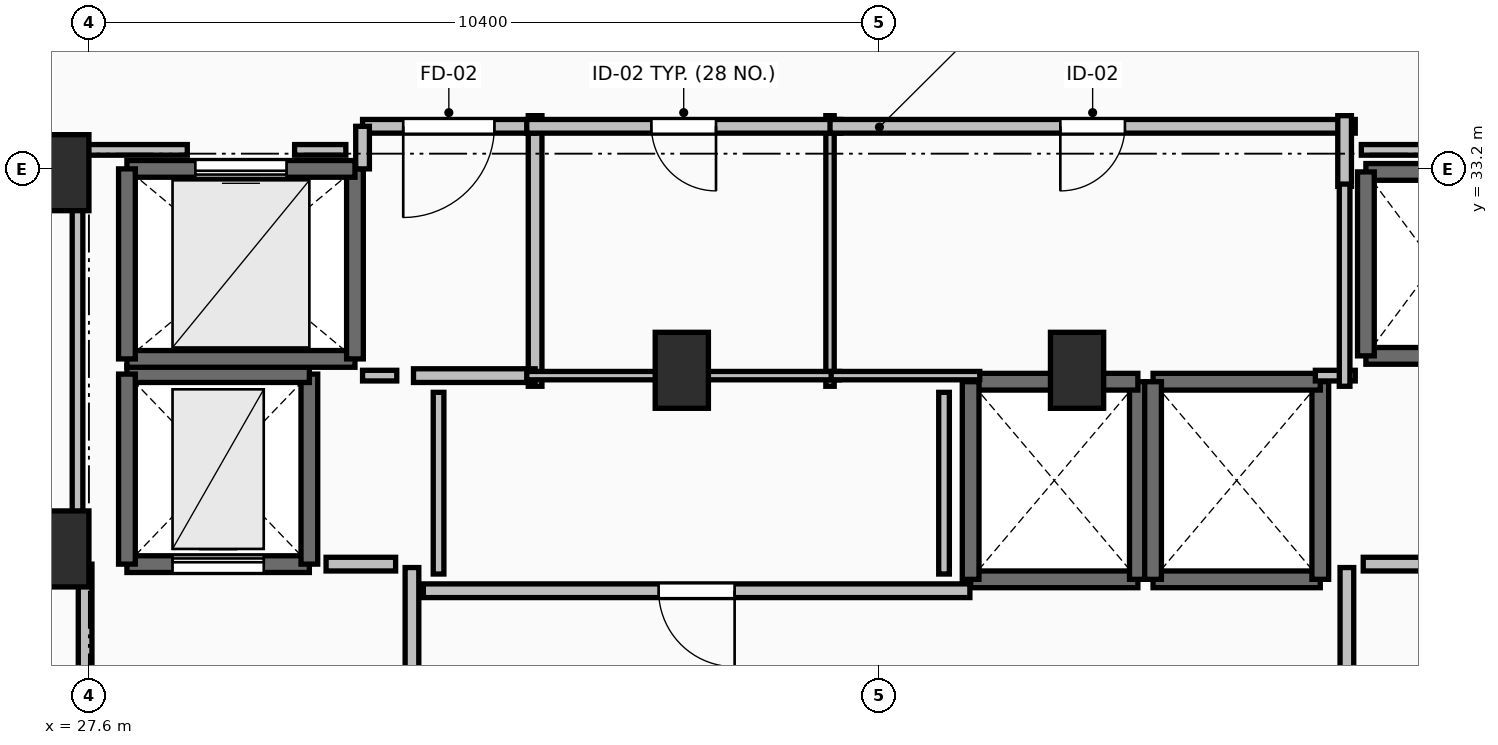
"""IFC4 building model, lengths in metres.
Left out: names, types, materials, properties, quantities, classifications, styles, units other than length and angle.
Written with IfcOpenShell. Run it as: python <this file> out.ifc"""

import sys

from ifc_helpers import new_model, si_unit, direction, frame, frame_2d, origin, origin_2d, place, context, subcontext, project, spatial, rectangle, extrude, element, fill, save


model = new_model("IFC4")
c1 = context("Model", 3, precision=1e-05, world=origin(), true_north=direction((0.0, 1.0)))
c2 = subcontext(c1, "Body", "Model", "MODEL_VIEW")
j1 = project(units=[si_unit("LENGTHUNIT", "METRE"), si_unit("PLANEANGLEUNIT", "RADIAN")], contexts=[c1])
p1 = place(None, origin())
s1 = spatial("IfcSite", under=j1, at=p1, CompositionType="ELEMENT")
p2 = place(p1, origin())
s2 = spatial("IfcBuilding", under=s1, at=p2, CompositionType="ELEMENT")
p3 = place(p2, frame((0.0, 0.0, 207.2)))
s3 = spatial("IfcBuildingStorey", under=s2, at=p3, CompositionType="ELEMENT", Elevation=207.2)
for number, where, z_axis, x_axis in (
    (1, (27.25, 28.2, 0.0), (0.0, 0.0, 1.0), (1.0, 0.0, 0.0)),
    (2, (27.25, 33.15, 0.0), (0.0, 0.0, 1.0), (1.0, 0.0, 0.0)),
    (3, (35.4, 30.55, 0.0), (0.0, 0.0, 1.0), (1.0, 0.0, 0.0)),
    (4, (40.6, 30.55, 0.0), (0.0, 0.0, 1.0), (1.0, 0.0, 0.0)),
):
    element("IfcColumn", number, at=place(p3, frame(where, z_axis=z_axis, x_axis=x_axis)), inside=s3, PredefinedType="PILASTER", context=c2, shape_type="SweptSolid", body=[
        extrude(rectangle(XDim=0.7, YDim=1.0, at=origin_2d()), origin(), (0.0, 0.0, 1.0), 3.55),
    ])
p4 = place(p3, frame((39.2, 27.8, 0.0), z_axis=(0.0, 0.0, 1.0), x_axis=(1.0, 0.0, 0.0)))
e5 = element("IfcWall", 5, at=p4, inside=s3, PredefinedType="SOLIDWALL", context=c2, shape_type="SweptSolid", body=[
    extrude(rectangle(XDim=2.2, YDim=0.22, at=frame_2d((1.1, 0.0))), origin(), (0.0, 0.0, 1.0), 3.29),
])
p5 = place(p3, frame((41.4, 27.8, 0.0), z_axis=(0.0, 0.0, 1.0), x_axis=(0.0, 1.0, 0.0)))
e6 = element("IfcWall", 6, at=p5, inside=s3, PredefinedType="SOLIDWALL", context=c2, shape_type="SweptSolid", body=[
    extrude(rectangle(XDim=2.6, YDim=0.22, at=frame_2d((1.3, 0.0))), origin(), (0.0, 0.0, 1.0), 3.29),
])
p6 = place(p3, frame((41.4, 30.4, 0.0), z_axis=(0.0, 0.0, 1.0), x_axis=(-1.0, 0.0, 0.0)))
e7 = element("IfcWall", 7, at=p6, inside=s3, PredefinedType="SOLIDWALL", context=c2, shape_type="SweptSolid", body=[
    extrude(rectangle(XDim=2.2, YDim=0.22, at=frame_2d((1.1, 0.0))), origin(), (0.0, 0.0, 1.0), 3.29),
])
p7 = place(p3, frame((39.2, 30.4, 0.0), z_axis=(0.0, 0.0, 1.0), x_axis=(0.0, -1.0, 0.0)))
e8 = element("IfcWall", 8, at=p7, inside=s3, PredefinedType="SOLIDWALL", context=c2, shape_type="SweptSolid", body=[
    extrude(rectangle(XDim=2.6, YDim=0.22, at=frame_2d((1.3, 0.0))), origin(), (0.0, 0.0, 1.0), 3.29),
])
p8 = place(p3, frame((41.6, 27.8, 0.0), z_axis=(0.0, 0.0, 1.0), x_axis=(1.0, 0.0, 0.0)))
e9 = element("IfcWall", 9, at=p8, inside=s3, PredefinedType="SOLIDWALL", context=c2, shape_type="SweptSolid", body=[
    extrude(rectangle(XDim=2.2, YDim=0.22, at=frame_2d((1.1, 0.0))), origin(), (0.0, 0.0, 1.0), 3.29),
])
p9 = place(p3, frame((43.8, 27.8, 0.0), z_axis=(0.0, 0.0, 1.0), x_axis=(0.0, 1.0, 0.0)))
e10 = element("IfcWall", 10, at=p9, inside=s3, PredefinedType="SOLIDWALL", context=c2, shape_type="SweptSolid", body=[
    extrude(rectangle(XDim=2.6, YDim=0.22, at=frame_2d((1.3, 0.0))), origin(), (0.0, 0.0, 1.0), 3.29),
])
p10 = place(p3, frame((43.8, 30.4, 0.0), z_axis=(0.0, 0.0, 1.0), x_axis=(-1.0, 0.0, 0.0)))
e11 = element("IfcWall", 11, at=p10, inside=s3, PredefinedType="SOLIDWALL", context=c2, shape_type="SweptSolid", body=[
    extrude(rectangle(XDim=2.2, YDim=0.22, at=frame_2d((1.1, 0.0))), origin(), (0.0, 0.0, 1.0), 3.29),
])
p11 = place(p3, frame((41.6, 30.4, 0.0), z_axis=(0.0, 0.0, 1.0), x_axis=(0.0, -1.0, 0.0)))
e12 = element("IfcWall", 12, at=p11, inside=s3, PredefinedType="SOLIDWALL", context=c2, shape_type="SweptSolid", body=[
    extrude(rectangle(XDim=2.6, YDim=0.22, at=frame_2d((1.3, 0.0))), origin(), (0.0, 0.0, 1.0), 3.29),
])
for number, where, z_axis, x_axis in (
    (13, (44.4, 30.74, 0.0), (0.0, 0.0, 1.0), (1.0, 0.0, 0.0)),
    (14, (46.2, 33.16, 0.0), (0.0, 0.0, 1.0), (-1.0, 0.0, 0.0)),
):
    element("IfcWall", number, at=place(p3, frame(where, z_axis=z_axis, x_axis=x_axis)), inside=s3, PredefinedType="SOLIDWALL", context=c2, shape_type="SweptSolid", body=[
        extrude(rectangle(XDim=1.8, YDim=0.22, at=frame_2d((0.9, 0.0))), origin(), (0.0, 0.0, 1.0), 3.29),
    ])
p12 = place(p3, frame((44.4, 33.16, 0.0), z_axis=(0.0, 0.0, 1.0), x_axis=(0.0, -1.0, 0.0)))
e15 = element("IfcWall", 15, at=p12, inside=s3, PredefinedType="SOLIDWALL", context=c2, shape_type="SweptSolid", body=[
    extrude(rectangle(XDim=2.42, YDim=0.22, at=frame_2d((1.21, 0.0))), origin(), (0.0, 0.0, 1.0), 3.29),
])
p13 = place(p3, frame((28.1, 28.0, 0.0), z_axis=(0.0, 0.0, 1.0), x_axis=(1.0, 0.0, 0.0)))
e16 = element("IfcWall", 16, at=p13, inside=s3, PredefinedType="SHEAR", context=c2, shape_type="SweptSolid", body=[
    extrude(rectangle(XDim=2.4, YDim=0.22, at=frame_2d((1.2, 0.0))), origin(), (0.0, 0.0, 1.0), 3.29),
])
p14 = place(p13, frame((0.6, 0.0, 0.0)))
e17 = element("IfcOpeningElement", 17, at=p14, cuts=e16, PredefinedType="OPENING", context=c2, shape_type="SweptSolid", body=[
    extrude(rectangle(XDim=1.2, YDim=2.2, at=frame_2d((0.6, 1.1))), frame((0.0, 0.125, 0.0), z_axis=(0.0, -1.0, 0.0), x_axis=(1.0, 0.0, 0.0)), (0.0, 0.0, 1.0), 0.25),
])
p15 = place(p3, frame((30.5, 28.0, 0.0), z_axis=(0.0, 0.0, 1.0), x_axis=(0.0, 1.0, 0.0)))
e18 = element("IfcWall", 18, at=p15, inside=s3, PredefinedType="SHEAR", context=c2, shape_type="SweptSolid", body=[
    extrude(rectangle(XDim=2.5, YDim=0.22, at=frame_2d((1.25, 0.0))), origin(), (0.0, 0.0, 1.0), 3.29),
])
p16 = place(p3, frame((30.5, 30.5, 0.0), z_axis=(0.0, 0.0, 1.0), x_axis=(-1.0, 0.0, 0.0)))
e19 = element("IfcWall", 19, at=p16, inside=s3, PredefinedType="SHEAR", context=c2, shape_type="SweptSolid", body=[
    extrude(rectangle(XDim=2.4, YDim=0.22, at=frame_2d((1.2, 0.0))), origin(), (0.0, 0.0, 1.0), 3.29),
])
p17 = place(p3, frame((28.1, 30.5, 0.0), z_axis=(0.0, 0.0, 1.0), x_axis=(0.0, -1.0, 0.0)))
e20 = element("IfcWall", 20, at=p17, inside=s3, PredefinedType="SHEAR", context=c2, shape_type="SweptSolid", body=[
    extrude(rectangle(XDim=2.5, YDim=0.22, at=frame_2d((1.25, 0.0))), origin(), (0.0, 0.0, 1.0), 3.29),
])
p18 = place(p3, frame((28.1, 30.7, 0.0), z_axis=(0.0, 0.0, 1.0), x_axis=(1.0, 0.0, 0.0)))
e21 = element("IfcWall", 21, at=p18, inside=s3, PredefinedType="SOLIDWALL", context=c2, shape_type="SweptSolid", body=[
    extrude(rectangle(XDim=3.0, YDim=0.22, at=frame_2d((1.5, 0.0))), origin(), (0.0, 0.0, 1.0), 3.29),
])
p19 = place(p3, frame((31.1, 30.7, 0.0), z_axis=(0.0, 0.0, 1.0), x_axis=(0.0, 1.0, 0.0)))
e22 = element("IfcWall", 22, at=p19, inside=s3, PredefinedType="SOLIDWALL", context=c2, shape_type="SweptSolid", body=[
    extrude(rectangle(XDim=2.5, YDim=0.22, at=frame_2d((1.25, 0.0))), origin(), (0.0, 0.0, 1.0), 3.29),
])
p20 = place(p3, frame((31.1, 33.2, 0.0), z_axis=(0.0, 0.0, 1.0), x_axis=(-1.0, 0.0, 0.0)))
e23 = element("IfcWall", 23, at=p20, inside=s3, PredefinedType="SOLIDWALL", context=c2, shape_type="SweptSolid", body=[
    extrude(rectangle(XDim=3.0, YDim=0.22, at=frame_2d((1.5, 0.0))), origin(), (0.0, 0.0, 1.0), 3.29),
])
p21 = place(p20, frame((0.9, 0.0, 0.0)))
e24 = element("IfcOpeningElement", 24, at=p21, cuts=e23, PredefinedType="OPENING", context=c2, shape_type="SweptSolid", body=[
    extrude(rectangle(XDim=1.2, YDim=2.2, at=frame_2d((0.6, 1.1))), frame((0.0, 0.125, 0.0), z_axis=(0.0, -1.0, 0.0), x_axis=(1.0, 0.0, 0.0)), (0.0, 0.0, 1.0), 0.25),
])
p22 = place(p3, frame((28.1, 33.2, 0.0), z_axis=(0.0, 0.0, 1.0), x_axis=(0.0, -1.0, 0.0)))
e25 = element("IfcWall", 25, at=p22, inside=s3, PredefinedType="SOLIDWALL", context=c2, shape_type="SweptSolid", body=[
    extrude(rectangle(XDim=2.5, YDim=0.22, at=frame_2d((1.25, 0.0))), origin(), (0.0, 0.0, 1.0), 3.29),
])
p23 = place(p3, frame((31.85, 24.045, 0.0), z_axis=(0.0, 0.0, 1.0), x_axis=(0.0, 1.0, 0.0)))
e26 = element("IfcWall", 26, at=p23, inside=s3, PredefinedType="PARTITIONING", context=c2, shape_type="SweptSolid", body=[
    extrude(rectangle(XDim=3.91, YDim=0.18, at=frame_2d((1.955, 0.0))), origin(), (0.0, 0.0, 1.0), 3.29),
])
p24 = place(p23, frame((1.355, 0.0, 0.0)))
e27 = element("IfcOpeningElement", 27, at=p24, cuts=e26, PredefinedType="OPENING", context=c2, shape_type="SweptSolid", body=[
    extrude(rectangle(XDim=1.2, YDim=2.15, at=frame_2d((0.6, 1.075))), frame((0.0, 0.105, 0.0), z_axis=(0.0, -1.0, 0.0), x_axis=(1.0, 0.0, 0.0)), (0.0, 0.0, 1.0), 0.21),
])
p25 = place(p3, frame((27.55, 28.0, 0.0), z_axis=(0.0, 0.0, 1.0), x_axis=(0.0, -1.0, 0.0)))
e28 = element("IfcWall", 28, at=p25, inside=s3, PredefinedType="PARTITIONING", context=c2, shape_type="SweptSolid", body=[
    extrude(rectangle(XDim=4.05, YDim=0.18, at=frame_2d((2.025, 0.0))), origin(), (0.0, 0.0, 1.0), 3.29),
])
p26 = place(p25, frame((1.425, 0.0, 0.0)))
e29 = element("IfcOpeningElement", 29, at=p26, cuts=e28, PredefinedType="OPENING", context=c2, shape_type="SweptSolid", body=[
    extrude(rectangle(XDim=1.2, YDim=2.15, at=frame_2d((0.6, 1.075))), frame((0.0, 0.105, 0.0), z_axis=(0.0, -1.0, 0.0), x_axis=(1.0, 0.0, 0.0)), (0.0, 0.0, 1.0), 0.21),
])
p27 = place(p3, frame((44.15, 27.955, 0.0), z_axis=(0.0, 0.0, 1.0), x_axis=(0.0, -1.0, 0.0)))
e30 = element("IfcWall", 30, at=p27, inside=s3, PredefinedType="PARTITIONING", context=c2, shape_type="SweptSolid", body=[
    extrude(rectangle(XDim=3.91, YDim=0.18, at=frame_2d((1.955, 0.0))), origin(), (0.0, 0.0, 1.0), 3.29),
])
p28 = place(p27, frame((1.355, 0.0, 0.0)))
e31 = element("IfcOpeningElement", 31, at=p28, cuts=e30, PredefinedType="OPENING", context=c2, shape_type="SweptSolid", body=[
    extrude(rectangle(XDim=1.2, YDim=2.15, at=frame_2d((0.6, 1.075))), frame((0.0, 0.105, 0.0), z_axis=(0.0, -1.0, 0.0), x_axis=(1.0, 0.0, 0.0)), (0.0, 0.0, 1.0), 0.21),
])
p29 = place(p3, frame((33.47, 30.34, 0.0), z_axis=(0.0, 0.0, 1.0), x_axis=(0.0, 1.0, 0.0)))
e32 = element("IfcWall", 32, at=p29, inside=s3, PredefinedType="PARTITIONING", context=c2, shape_type="SweptSolid", body=[
    extrude(rectangle(XDim=3.56, YDim=0.18, at=frame_2d((1.78, 0.0))), origin(), (0.0, 0.0, 1.0), 3.29),
])
p30 = place(p3, frame((31.87, 30.48, 0.0), z_axis=(0.0, 0.0, 1.0), x_axis=(1.0, 0.0, 0.0)))
e33 = element("IfcWall", 33, at=p30, inside=s3, PredefinedType="PARTITIONING", context=c2, shape_type="SweptSolid", body=[
    extrude(rectangle(XDim=1.6, YDim=0.18, at=frame_2d((0.8, 0.0))), origin(), (0.0, 0.0, 1.0), 3.29),
])
p31 = place(p3, frame((33.47, 33.76, 0.0), z_axis=(0.0, 0.0, 1.0), x_axis=(-1.0, 0.0, 0.0)))
e34 = element("IfcWall", 34, at=p31, inside=s3, PredefinedType="PARTITIONING", context=c2, shape_type="SweptSolid", body=[
    extrude(rectangle(XDim=2.27, YDim=0.18, at=frame_2d((1.135, 0.0))), origin(), (0.0, 0.0, 1.0), 3.29),
])
p32 = place(p31, frame((0.535, 0.0, 0.0)))
e35 = element("IfcOpeningElement", 35, at=p32, cuts=e34, PredefinedType="OPENING", context=c2, shape_type="SweptSolid", body=[
    extrude(rectangle(XDim=1.2, YDim=2.15, at=frame_2d((0.6, 1.075))), frame((0.0, 0.105, 0.0), z_axis=(0.0, -1.0, 0.0), x_axis=(1.0, 0.0, 0.0)), (0.0, 0.0, 1.0), 0.21),
])
p33 = place(p3, frame((31.2, 33.76, 0.0), z_axis=(0.0, 0.0, 1.0), x_axis=(0.0, -1.0, 0.0)))
e36 = element("IfcWall", 36, at=p33, inside=s3, PredefinedType="PARTITIONING", context=c2, shape_type="SweptSolid", body=[
    extrude(rectangle(XDim=0.56, YDim=0.18, at=frame_2d((0.28, 0.0))), origin(), (0.0, 0.0, 1.0), 3.29),
])
p34 = place(p3, frame((39.19, 27.65, 0.0), z_axis=(0.0, 0.0, 1.0), x_axis=(-1.0, 0.0, 0.0)))
e37 = element("IfcWall", 37, at=p34, inside=s3, PredefinedType="PARTITIONING", context=c2, shape_type="SweptSolid", body=[
    extrude(rectangle(XDim=7.19, YDim=0.18, at=frame_2d((3.595, 0.0))), origin(), (0.0, 0.0, 1.0), 3.29),
])
p35 = place(p34, frame((3.095, 0.0, 0.0)))
e38 = element("IfcOpeningElement", 38, at=p35, cuts=e37, PredefinedType="OPENING", context=c2, shape_type="SweptSolid", body=[
    extrude(rectangle(XDim=1.0, YDim=2.15, at=frame_2d((0.5, 1.075))), frame((0.0, 0.105, 0.0), z_axis=(0.0, -1.0, 0.0), x_axis=(1.0, 0.0, 0.0)), (0.0, 0.0, 1.0), 0.21),
])
p36 = place(p3, frame((37.35, 30.34, 0.0), z_axis=(0.0, 0.0, 1.0), x_axis=(0.0, 1.0, 0.0)))
e39 = element("IfcWall", 39, at=p36, inside=s3, PredefinedType="PARTITIONING", context=c2, shape_type="SweptSolid", body=[
    extrude(rectangle(XDim=3.56, YDim=0.11, at=frame_2d((1.78, 0.0))), origin(), (0.0, 0.0, 1.0), 2.482),
])
p37 = place(p3, frame((33.36, 30.48, 0.0), z_axis=(0.0, 0.0, 1.0), x_axis=(1.0, 0.0, 0.0)))
e40 = element("IfcWall", 40, at=p37, inside=s3, PredefinedType="PARTITIONING", context=c2, shape_type="SweptSolid", body=[
    extrude(rectangle(XDim=4.115, YDim=0.11, at=frame_2d((2.058, 0.0))), origin(), (0.0, 0.0, 1.0), 2.482),
])
p38 = place(p3, frame((37.49, 33.76, 0.0), z_axis=(0.0, 0.0, 1.0), x_axis=(-1.0, 0.0, 0.0)))
e41 = element("IfcWall", 41, at=p38, inside=s3, PredefinedType="PARTITIONING", context=c2, shape_type="SweptSolid", body=[
    extrude(rectangle(XDim=4.13, YDim=0.18, at=frame_2d((2.065, 0.0))), origin(), (0.0, 0.0, 1.0), 3.29),
])
p39 = place(p38, frame((1.64, 0.0, 0.0)))
e42 = element("IfcOpeningElement", 42, at=p39, cuts=e41, PredefinedType="OPENING", context=c2, shape_type="SweptSolid", body=[
    extrude(rectangle(XDim=0.85, YDim=2.1, at=frame_2d((0.425, 1.05))), frame((0.0, 0.105, 0.0), z_axis=(0.0, -1.0, 0.0), x_axis=(1.0, 0.0, 0.0)), (0.0, 0.0, 1.0), 0.21),
])
p40 = place(p3, frame((37.365, 30.48, 0.0), z_axis=(0.0, 0.0, 1.0), x_axis=(1.0, 0.0, 0.0)))
e43 = element("IfcWall", 43, at=p40, inside=s3, PredefinedType="PARTITIONING", context=c2, shape_type="SweptSolid", body=[
    extrude(rectangle(XDim=1.955, YDim=0.11, at=frame_2d((0.978, 0.0))), origin(), (0.0, 0.0, 1.0), 2.482),
])
p41 = place(p3, frame((44.26, 33.76, 0.0), z_axis=(0.0, 0.0, 1.0), x_axis=(-1.0, 0.0, 0.0)))
e44 = element("IfcWall", 44, at=p41, inside=s3, PredefinedType="PARTITIONING", context=c2, shape_type="SweptSolid", body=[
    extrude(rectangle(XDim=6.91, YDim=0.18, at=frame_2d((3.455, 0.0))), origin(), (0.0, 0.0, 1.0), 3.29),
])
p42 = place(p41, frame((3.03, 0.0, 0.0)))
e45 = element("IfcOpeningElement", 45, at=p42, cuts=e44, PredefinedType="OPENING", context=c2, shape_type="SweptSolid", body=[
    extrude(rectangle(XDim=0.85, YDim=2.1, at=frame_2d((0.425, 1.05))), frame((0.0, 0.105, 0.0), z_axis=(0.0, -1.0, 0.0), x_axis=(1.0, 0.0, 0.0)), (0.0, 0.0, 1.0), 0.21),
])
p43 = place(p3, frame((44.12, 32.97, 0.0), z_axis=(0.0, 0.0, 1.0), x_axis=(0.0, 1.0, 0.0)))
e46 = element("IfcWall", 46, at=p43, inside=s3, PredefinedType="PARTITIONING", context=c2, shape_type="SweptSolid", body=[
    extrude(rectangle(XDim=0.93, YDim=0.18, at=frame_2d((0.465, 0.0))), origin(), (0.0, 0.0, 1.0), 3.29),
])
for number, where, z_axis, x_axis in (
    (47, (31.635, 28.0, 0.0), (0.0, 0.0, 1.0), (-1.0, 0.0, 0.0)),
    (48, (45.28, 28.0, 0.0), (0.0, 0.0, 1.0), (-1.0, 0.0, 0.0)),
):
    element("IfcWall", number, at=place(p3, frame(where, z_axis=z_axis, x_axis=x_axis)), inside=s3, PredefinedType="PARTITIONING", context=c2, shape_type="SweptSolid", body=[
        extrude(rectangle(XDim=0.915, YDim=0.18, at=frame_2d((0.458, 0.0))), origin(), (0.0, 0.0, 1.0), 3.29),
    ])
p44 = place(p3, frame((31.2, 30.48, 0.0), z_axis=(0.0, 0.0, 1.0), x_axis=(1.0, 0.0, 0.0)))
e49 = element("IfcWall", 49, at=p44, inside=s3, PredefinedType="PARTITIONING", context=c2, shape_type="SweptSolid", body=[
    extrude(rectangle(XDim=0.45, YDim=0.14, at=frame_2d((0.225, 0.0))), origin(), (0.0, 0.0, 1.0), 3.29),
])
p45 = place(p3, frame((43.735, 30.48, 0.0), z_axis=(0.0, 0.0, 1.0), x_axis=(1.0, 0.0, 0.0)))
e50 = element("IfcWall", 50, at=p45, inside=s3, PredefinedType="PARTITIONING", context=c2, shape_type="SweptSolid", body=[
    extrude(rectangle(XDim=0.525, YDim=0.14, at=frame_2d((0.262, 0.0))), origin(), (0.0, 0.0, 1.0), 3.29),
])
p46 = place(p3, frame((44.12, 30.34, 0.0), z_axis=(0.0, 0.0, 1.0), x_axis=(0.0, 1.0, 0.0)))
e51 = element("IfcWall", 51, at=p46, inside=s3, PredefinedType="PARTITIONING", context=c2, shape_type="SweptSolid", body=[
    extrude(rectangle(XDim=2.66, YDim=0.14, at=frame_2d((1.33, 0.0))), origin(), (0.0, 0.0, 1.0), 3.29),
])
for number, where, z_axis, x_axis in (
    (52, (32.2, 30.26, 0.0), (0.0, 0.0, 1.0), (0.0, -1.0, 0.0)),
    (53, (38.85, 27.87, 0.0), (0.0, 0.0, 1.0), (0.0, 1.0, 0.0)),
):
    element("IfcWall", number, at=place(p3, frame(where, z_axis=z_axis, x_axis=x_axis)), inside=s3, PredefinedType="PARTITIONING", context=c2, shape_type="SweptSolid", body=[
        extrude(rectangle(XDim=2.39, YDim=0.14, at=frame_2d((1.195, 0.0))), origin(), (0.0, 0.0, 1.0), 3.29),
    ])
p47 = place(p3, frame((48.55, 33.45, 0.0), z_axis=(0.0, 0.0, 1.0), x_axis=(-1.0, 0.0, 0.0)))
e54 = element("IfcWall", 54, at=p47, inside=s3, PredefinedType="PARTITIONING", context=c2, shape_type="SweptSolid", body=[
    extrude(rectangle(XDim=4.21, YDim=0.14, at=frame_2d((2.105, 0.0))), origin(), (0.0, 0.0, 1.0), 2.482),
])
p48 = place(p3, frame((30.98, 33.45, 0.0), z_axis=(0.0, 0.0, 1.0), x_axis=(-1.0, 0.0, 0.0)))
e55 = element("IfcWall", 55, at=p48, inside=s3, PredefinedType="PARTITIONING", context=c2, shape_type="SweptSolid", body=[
    extrude(rectangle(XDim=0.674, YDim=0.14, at=frame_2d((0.337, 0.0))), origin(), (0.0, 0.0, 1.0), 3.29),
])
p49 = place(p3, frame((28.894, 33.45, 0.0), z_axis=(0.0, 0.0, 1.0), x_axis=(-1.0, 0.0, 0.0)))
e56 = element("IfcWall", 56, at=p49, inside=s3, PredefinedType="PARTITIONING", context=c2, shape_type="SweptSolid", body=[
    extrude(rectangle(XDim=1.444, YDim=0.14, at=frame_2d((0.722, 0.0))), origin(), (0.0, 0.0, 1.0), 2.482),
])
p50 = place(p3, frame((27.45, 33.45, 0.0), z_axis=(0.0, 0.0, 1.0), x_axis=(0.0, -1.0, 0.0)))
e57 = element("IfcWall", 57, at=p50, inside=s3, PredefinedType="PARTITIONING", context=c2, shape_type="SweptSolid", body=[
    extrude(rectangle(XDim=5.254, YDim=0.14, at=frame_2d((2.627, 0.0))), origin(), (0.0, 0.0, 1.0), 2.482),
])
p51 = place(p14, origin())
e58 = element("IfcDoor", 58, at=p51, inside=s3, OperationType="SLIDING_TO_LEFT", PredefinedType="DOOR", context=c2, shape_type="SweptSolid", body=[
    extrude(rectangle(XDim=1.2, YDim=2.2, at=frame_2d((0.6, 1.1))), frame((0.0, 0.025, 0.0), z_axis=(0.0, -1.0, 0.0), x_axis=(1.0, 0.0, 0.0)), (0.0, 0.0, 1.0), 0.05),
])
fill(e17, e58)
p52 = place(p21, origin())
e59 = element("IfcDoor", 59, at=p52, inside=s3, OperationType="SLIDING_TO_LEFT", PredefinedType="DOOR", context=c2, shape_type="SweptSolid", body=[
    extrude(rectangle(XDim=1.2, YDim=2.2, at=frame_2d((0.6, 1.1))), frame((0.0, 0.025, 0.0), z_axis=(0.0, -1.0, 0.0), x_axis=(1.0, 0.0, 0.0)), (0.0, 0.0, 1.0), 0.05),
])
fill(e24, e59)
p53 = place(p32, origin())
e60 = element("IfcDoor", 60, at=p53, inside=s3, OperationType="SINGLE_SWING_RIGHT", PredefinedType="DOOR", context=c2, shape_type="SweptSolid", body=[
    extrude(rectangle(XDim=1.2, YDim=2.15, at=frame_2d((0.6, 1.075))), frame((0.0, 0.025, 0.0), z_axis=(0.0, -1.0, 0.0), x_axis=(1.0, 0.0, 0.0)), (0.0, 0.0, 1.0), 0.05),
])
fill(e35, e60)
p54 = place(p35, origin())
e61 = element("IfcDoor", 61, at=p54, inside=s3, OperationType="SINGLE_SWING_LEFT", PredefinedType="DOOR", context=c2, shape_type="SweptSolid", body=[
    extrude(rectangle(XDim=1.0, YDim=2.15, at=frame_2d((0.5, 1.075))), frame((0.0, 0.025, 0.0), z_axis=(0.0, -1.0, 0.0), x_axis=(1.0, 0.0, 0.0)), (0.0, 0.0, 1.0), 0.05),
])
fill(e38, e61)
p55 = place(p39, origin())
e62 = element("IfcDoor", 62, at=p55, inside=s3, OperationType="SINGLE_SWING_LEFT", PredefinedType="DOOR", context=c2, shape_type="SweptSolid", body=[
    extrude(rectangle(XDim=0.85, YDim=2.1, at=frame_2d((0.425, 1.05))), frame((0.0, 0.025, 0.0), z_axis=(0.0, -1.0, 0.0), x_axis=(1.0, 0.0, 0.0)), (0.0, 0.0, 1.0), 0.05),
])
fill(e42, e62)
p56 = place(p42, origin())
e63 = element("IfcDoor", 63, at=p56, inside=s3, OperationType="SINGLE_SWING_RIGHT", PredefinedType="DOOR", context=c2, shape_type="SweptSolid", body=[
    extrude(rectangle(XDim=0.85, YDim=2.1, at=frame_2d((0.425, 1.05))), frame((0.0, 0.025, 0.0), z_axis=(0.0, -1.0, 0.0), x_axis=(1.0, 0.0, 0.0)), (0.0, 0.0, 1.0), 0.05),
])
fill(e45, e63)
save(model, sys.argv[1])
